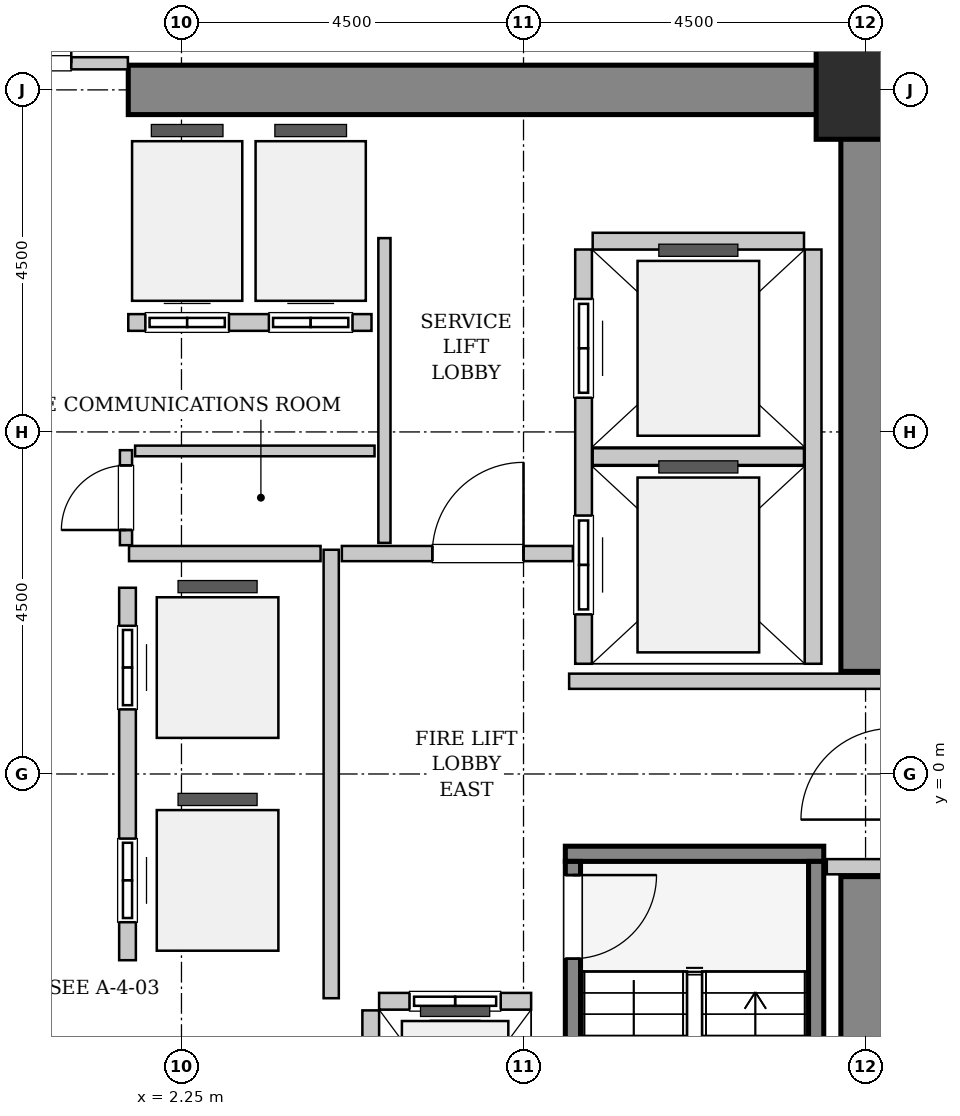
"""IFC4 building model, lengths in metres.
Left out: names, types, materials, properties, quantities, classifications, styles, units other than length and angle.
Written with IfcOpenShell. Run it as: python <this file> out.ifc"""

import sys

from ifc_helpers import new_model, si_unit, direction, frame, frame_2d, origin, origin_2d, place, context, subcontext, project, spatial, rectangle, hollow_rectangle, extrude, source, transform, mapped, element, fill, save


model = new_model("IFC4")
c1 = context("Model", 3, precision=1e-05, world=origin(), true_north=direction((0.0, 1.0)))
c2 = subcontext(c1, "Body", "Model", "MODEL_VIEW")
j1 = project(units=[si_unit("LENGTHUNIT", "METRE"), si_unit("PLANEANGLEUNIT", "RADIAN")], contexts=[c1])
p1 = place(None, origin())
s1 = spatial("IfcSite", under=j1, at=p1, CompositionType="ELEMENT")
p2 = place(p1, origin())
s2 = spatial("IfcBuilding", under=s1, at=p2, CompositionType="ELEMENT")
p3 = place(p2, origin())
s3 = spatial("IfcBuildingStorey", under=s2, at=p3, CompositionType="ELEMENT", Elevation=0.0)
m1 = source(origin(), c2, "Body", "SweptSolid", [
    extrude(rectangle(XDim=10.025, YDim=0.65, at=frame_2d((5.012, 0.0))), origin(), (0.0, 0.0, 1.0), 6.0),
])
p4 = place(p3, frame((1.55, 9.0, 0.0), z_axis=(0.0, 0.0, 1.0), x_axis=(1.0, 0.0, 0.0)))
e1 = element("IfcWall", 1, at=p4, inside=s3, PredefinedType="SHEAR", context=c2, shape_type="MappedRepresentation", body=[
    mapped(m1, transform((0.0, 0.0, 0.0), x_axis=(1.0, 0.0, 0.0), y_axis=(0.0, 1.0, 0.0), z_axis=(0.0, 0.0, 1.0), scale=1.0)),
])
m2 = source(origin(), c2, "Body", "SweptSolid", [
    extrude(rectangle(XDim=7.325, YDim=0.65, at=frame_2d((3.663, 0.0))), origin(), (0.0, 0.0, 1.0), 6.0),
])
for number, where, z_axis, x_axis in (
    (2, (11.25, -8.675, 0.0), (0.0, 0.0, 1.0), (0.0, 1.0, 0.0)),
    (3, (11.25, 1.35, 0.0), (0.0, 0.0, 1.0), (0.0, 1.0, 0.0)),
):
    element("IfcWall", number, at=place(p3, frame(where, z_axis=z_axis, x_axis=x_axis)), inside=s3, PredefinedType="SHEAR", context=c2, shape_type="MappedRepresentation", body=[
        mapped(m2, transform((0.0, 0.0, 0.0), x_axis=(1.0, 0.0, 0.0), y_axis=(0.0, 1.0, 0.0), z_axis=(0.0, 0.0, 1.0), scale=1.0)),
    ])
m3 = source(origin(), c2, "Body", "SweptSolid", [
    extrude(hollow_rectangle(XDim=1.3, YDim=1.3, WallThickness=0.065, InnerFilletRadius=0.065, OuterFilletRadius=0.13, at=origin_2d()), origin(), (0.0, 0.0, 1.0), 6.0),
])
p5 = place(p3, frame((11.25, 9.0, 0.0), z_axis=(0.0, 0.0, 1.0), x_axis=(1.0, 0.0, 0.0)))
e4 = element("IfcColumn", 4, at=p5, inside=s3, PredefinedType="COLUMN", context=c2, shape_type="MappedRepresentation", body=[
    mapped(m3, transform((0.0, 0.0, 0.0), x_axis=(1.0, 0.0, 0.0), y_axis=(0.0, 1.0, 0.0), z_axis=(0.0, 0.0, 1.0), scale=1.0)),
])
m4 = source(origin(), c2, "Body", "SweptSolid", [
    extrude(rectangle(XDim=3.4, YDim=0.2, at=frame_2d((1.7, 0.0))), origin(), (0.0, 0.0, 1.0), 6.0),
])
p6 = place(p3, frame((7.3, -1.05, 0.0), z_axis=(0.0, 0.0, 1.0), x_axis=(1.0, 0.0, 0.0)))
e5 = element("IfcWall", 5, at=p6, inside=s3, PredefinedType="SOLIDWALL", context=c2, shape_type="MappedRepresentation", body=[
    mapped(m4, transform((0.0, 0.0, 0.0), x_axis=(1.0, 0.0, 0.0), y_axis=(0.0, 1.0, 0.0), z_axis=(0.0, 0.0, 1.0), scale=1.0)),
])
m5 = source(origin(), c2, "Body", "SweptSolid", [
    extrude(rectangle(XDim=7.1, YDim=0.2, at=frame_2d((3.55, 0.0))), origin(), (0.0, 0.0, 1.0), 6.0),
])
p7 = place(p3, frame((7.4, -1.15, 0.0), z_axis=(0.0, 0.0, 1.0), x_axis=(0.0, -1.0, 0.0)))
e6 = element("IfcWall", 6, at=p7, inside=s3, PredefinedType="SOLIDWALL", context=c2, shape_type="MappedRepresentation", body=[
    mapped(m5, transform((0.0, 0.0, 0.0), x_axis=(1.0, 0.0, 0.0), y_axis=(0.0, 1.0, 0.0), z_axis=(0.0, 0.0, 1.0), scale=1.0)),
])
p8 = place(p7, frame((0.18, 0.0, 0.0)))
e7 = element("IfcOpeningElement", 7, at=p8, cuts=e6, PredefinedType="OPENING", context=c2, shape_type="SweptSolid", body=[
    extrude(rectangle(XDim=1.1, YDim=2.15, at=frame_2d((0.55, 1.075))), frame((0.0, 0.11, 0.0), z_axis=(0.0, -1.0, 0.0), x_axis=(1.0, 0.0, 0.0)), (0.0, 0.0, 1.0), 0.22),
])
p9 = place(p3, frame((10.6, -1.15, 0.0), z_axis=(0.0, 0.0, 1.0), x_axis=(0.0, -1.0, 0.0)))
e8 = element("IfcWall", 8, at=p9, inside=s3, PredefinedType="SOLIDWALL", context=c2, shape_type="MappedRepresentation", body=[
    mapped(m5, transform((0.0, 0.0, 0.0), x_axis=(1.0, 0.0, 0.0), y_axis=(0.0, 1.0, 0.0), z_axis=(0.0, 0.0, 1.0), scale=1.0)),
])
m6 = source(origin(), c2, "Body", "SweptSolid", [
    extrude(rectangle(XDim=2.0, YDim=0.22, at=frame_2d((1.0, 0.0))), origin(), (0.0, 0.0, 1.0), 5.685),
])
p10 = place(p3, frame((6.85, -2.99, 0.0), z_axis=(0.0, 0.0, 1.0), x_axis=(-1.0, 0.0, 0.0)))
e9 = element("IfcWall", 9, at=p10, inside=s3, PredefinedType="SOLIDWALL", context=c2, shape_type="MappedRepresentation", body=[
    mapped(m6, transform((0.0, 0.0, 0.0), x_axis=(1.0, 0.0, 0.0), y_axis=(0.0, 1.0, 0.0), z_axis=(0.0, 0.0, 1.0), scale=1.0)),
])
p11 = place(p10, frame((0.4, 0.0, 0.0)))
e10 = element("IfcOpeningElement", 10, at=p11, cuts=e9, PredefinedType="OPENING", context=c2, shape_type="SweptSolid", body=[
    extrude(rectangle(XDim=1.2, YDim=2.2, at=frame_2d((0.6, 1.1))), frame((0.0, 0.12, 0.0), z_axis=(0.0, -1.0, 0.0), x_axis=(1.0, 0.0, 0.0)), (0.0, 0.0, 1.0), 0.24),
])
m7 = source(origin(), c2, "Body", "SweptSolid", [
    extrude(rectangle(XDim=2.68, YDim=0.22, at=frame_2d((1.34, 0.0))), origin(), (0.0, 0.0, 1.0), 5.685),
])
p12 = place(p3, frame((4.74, -3.11, 0.0), z_axis=(0.0, 0.0, 1.0), x_axis=(0.0, -1.0, 0.0)))
e11 = element("IfcWall", 11, at=p12, inside=s3, PredefinedType="SOLIDWALL", context=c2, shape_type="MappedRepresentation", body=[
    mapped(m7, transform((0.0, 0.0, 0.0), x_axis=(1.0, 0.0, 0.0), y_axis=(0.0, 1.0, 0.0), z_axis=(0.0, 0.0, 1.0), scale=1.0)),
])
m8 = source(origin(), c2, "Body", "SweptSolid", [
    extrude(rectangle(XDim=5.45, YDim=0.22, at=frame_2d((2.725, 0.0))), origin(), (0.0, 0.0, 1.0), 5.685),
])
p13 = place(p3, frame((7.54, 6.9, 0.0), z_axis=(0.0, 0.0, 1.0), x_axis=(0.0, -1.0, 0.0)))
e12 = element("IfcWall", 12, at=p13, inside=s3, PredefinedType="SOLIDWALL", context=c2, shape_type="MappedRepresentation", body=[
    mapped(m8, transform((0.0, 0.0, 0.0), x_axis=(1.0, 0.0, 0.0), y_axis=(0.0, 1.0, 0.0), z_axis=(0.0, 0.0, 1.0), scale=1.0)),
])
p14 = place(p13, frame((3.5, 0.0, 0.0)))
e13 = element("IfcOpeningElement", 13, at=p14, cuts=e12, PredefinedType="OPENING", context=c2, shape_type="SweptSolid", body=[
    extrude(rectangle(XDim=1.3, YDim=2.3, at=frame_2d((0.65, 1.15))), frame((0.0, 0.12, 0.0), z_axis=(0.0, -1.0, 0.0), x_axis=(1.0, 0.0, 0.0)), (0.0, 0.0, 1.0), 0.24),
])
p15 = place(p13, frame((0.65, 0.0, 0.0)))
e14 = element("IfcOpeningElement", 14, at=p15, cuts=e12, PredefinedType="OPENING", context=c2, shape_type="SweptSolid", body=[
    extrude(rectangle(XDim=1.3, YDim=2.3, at=frame_2d((0.65, 1.15))), frame((0.0, 0.12, 0.0), z_axis=(0.0, -1.0, 0.0), x_axis=(1.0, 0.0, 0.0)), (0.0, 0.0, 1.0), 0.24),
])
p16 = place(p3, frame((10.56, 1.45, 0.0), z_axis=(0.0, 0.0, 1.0), x_axis=(0.0, 1.0, 0.0)))
e15 = element("IfcWall", 15, at=p16, inside=s3, PredefinedType="SOLIDWALL", context=c2, shape_type="MappedRepresentation", body=[
    mapped(m8, transform((0.0, 0.0, 0.0), x_axis=(1.0, 0.0, 0.0), y_axis=(0.0, 1.0, 0.0), z_axis=(0.0, 0.0, 1.0), scale=1.0)),
])
m9 = source(origin(), c2, "Body", "SweptSolid", [
    extrude(rectangle(XDim=2.78, YDim=0.22, at=frame_2d((1.39, 0.0))), origin(), (0.0, 0.0, 1.0), 5.685),
])
for number, where, z_axis, x_axis in (
    (16, (7.66, 4.175, 0.0), (0.0, 0.0, 1.0), (1.0, 0.0, 0.0)),
    (17, (10.44, 7.01, 0.0), (0.0, 0.0, 1.0), (-1.0, 0.0, 0.0)),
):
    element("IfcWall", number, at=place(p3, frame(where, z_axis=z_axis, x_axis=x_axis)), inside=s3, PredefinedType="SOLIDWALL", context=c2, shape_type="MappedRepresentation", body=[
        mapped(m9, transform((0.0, 0.0, 0.0), x_axis=(1.0, 0.0, 0.0), y_axis=(0.0, 1.0, 0.0), z_axis=(0.0, 0.0, 1.0), scale=1.0)),
    ])
m10 = source(origin(), c2, "Body", "SweptSolid", [
    extrude(rectangle(XDim=3.2, YDim=0.22, at=frame_2d((1.6, 0.0))), origin(), (0.0, 0.0, 1.0), 5.685),
])
p17 = place(p3, frame((1.55, 5.94, 0.0), z_axis=(0.0, 0.0, 1.0), x_axis=(1.0, 0.0, 0.0)))
e18 = element("IfcWall", 18, at=p17, inside=s3, PredefinedType="SOLIDWALL", context=c2, shape_type="MappedRepresentation", body=[
    mapped(m10, transform((0.0, 0.0, 0.0), x_axis=(1.0, 0.0, 0.0), y_axis=(0.0, 1.0, 0.0), z_axis=(0.0, 0.0, 1.0), scale=1.0)),
])
p18 = place(p17, frame((0.225, 0.0, 0.0)))
e19 = element("IfcOpeningElement", 19, at=p18, cuts=e18, PredefinedType="OPENING", context=c2, shape_type="SweptSolid", body=[
    extrude(rectangle(XDim=1.1, YDim=2.2, at=frame_2d((0.55, 1.1))), frame((0.0, 0.12, 0.0), z_axis=(0.0, -1.0, 0.0), x_axis=(1.0, 0.0, 0.0)), (0.0, 0.0, 1.0), 0.24),
])
p19 = place(p17, frame((1.85, 0.0, 0.0)))
e20 = element("IfcOpeningElement", 20, at=p19, cuts=e18, PredefinedType="OPENING", context=c2, shape_type="SweptSolid", body=[
    extrude(rectangle(XDim=1.1, YDim=2.2, at=frame_2d((0.55, 1.1))), frame((0.0, 0.12, 0.0), z_axis=(0.0, -1.0, 0.0), x_axis=(1.0, 0.0, 0.0)), (0.0, 0.0, 1.0), 0.24),
])
m11 = source(origin(), c2, "Body", "SweptSolid", [
    extrude(rectangle(XDim=4.9, YDim=0.22, at=frame_2d((2.45, 0.0))), origin(), (0.0, 0.0, 1.0), 5.685),
])
p20 = place(p3, frame((1.54, 2.45, 0.0), z_axis=(0.0, 0.0, 1.0), x_axis=(0.0, -1.0, 0.0)))
e21 = element("IfcWall", 21, at=p20, inside=s3, PredefinedType="SOLIDWALL", context=c2, shape_type="MappedRepresentation", body=[
    mapped(m11, transform((0.0, 0.0, 0.0), x_axis=(1.0, 0.0, 0.0), y_axis=(0.0, 1.0, 0.0), z_axis=(0.0, 0.0, 1.0), scale=1.0)),
])
p21 = place(p20, frame((3.3, 0.0, 0.0)))
e22 = element("IfcOpeningElement", 22, at=p21, cuts=e21, PredefinedType="OPENING", context=c2, shape_type="SweptSolid", body=[
    extrude(rectangle(XDim=1.1, YDim=2.2, at=frame_2d((0.55, 1.1))), frame((0.0, 0.12, 0.0), z_axis=(0.0, -1.0, 0.0), x_axis=(1.0, 0.0, 0.0)), (0.0, 0.0, 1.0), 0.24),
])
p22 = place(p20, frame((0.5, 0.0, 0.0)))
e23 = element("IfcOpeningElement", 23, at=p22, cuts=e21, PredefinedType="OPENING", context=c2, shape_type="SweptSolid", body=[
    extrude(rectangle(XDim=1.1, YDim=2.2, at=frame_2d((0.55, 1.1))), frame((0.0, 0.12, 0.0), z_axis=(0.0, -1.0, 0.0), x_axis=(1.0, 0.0, 0.0)), (0.0, 0.0, 1.0), 0.24),
])
m12 = source(origin(), c2, "Body", "SweptSolid", [
    extrude(rectangle(XDim=5.9, YDim=0.2, at=frame_2d((2.95, 0.0))), origin(), (0.0, 0.0, 1.0), 5.685),
])
p23 = place(p3, frame((4.22, -2.95, 0.0), z_axis=(0.0, 0.0, 1.0), x_axis=(0.0, 1.0, 0.0)))
e24 = element("IfcWall", 24, at=p23, inside=s3, PredefinedType="PARTITIONING", context=c2, shape_type="MappedRepresentation", body=[
    mapped(m12, transform((0.0, 0.0, 0.0), x_axis=(1.0, 0.0, 0.0), y_axis=(0.0, 1.0, 0.0), z_axis=(0.0, 0.0, 1.0), scale=1.0)),
])
m13 = source(origin(), c2, "Body", "SweptSolid", [
    extrude(rectangle(XDim=2.52, YDim=0.2, at=frame_2d((1.26, 0.0))), origin(), (0.0, 0.0, 1.0), 5.685),
])
p24 = place(p3, frame((1.56, 2.9, 0.0), z_axis=(0.0, 0.0, 1.0), x_axis=(1.0, 0.0, 0.0)))
e25 = element("IfcWall", 25, at=p24, inside=s3, PredefinedType="PARTITIONING", context=c2, shape_type="MappedRepresentation", body=[
    mapped(m13, transform((0.0, 0.0, 0.0), x_axis=(1.0, 0.0, 0.0), y_axis=(0.0, 1.0, 0.0), z_axis=(0.0, 0.0, 1.0), scale=1.0)),
])
m14 = source(origin(), c2, "Body", "SweptSolid", [
    extrude(rectangle(XDim=3.04, YDim=0.2, at=frame_2d((1.52, 0.0))), origin(), (0.0, 0.0, 1.0), 5.685),
])
p25 = place(p3, frame((4.36, 2.9, 0.0), z_axis=(0.0, 0.0, 1.0), x_axis=(1.0, 0.0, 0.0)))
e26 = element("IfcWall", 26, at=p25, inside=s3, PredefinedType="PARTITIONING", context=c2, shape_type="MappedRepresentation", body=[
    mapped(m14, transform((0.0, 0.0, 0.0), x_axis=(1.0, 0.0, 0.0), y_axis=(0.0, 1.0, 0.0), z_axis=(0.0, 0.0, 1.0), scale=1.0)),
])
p26 = place(p25, frame((1.19, 0.0, 0.0)))
e27 = element("IfcOpeningElement", 27, at=p26, cuts=e26, PredefinedType="OPENING", context=c2, shape_type="SweptSolid", body=[
    extrude(rectangle(XDim=1.2, YDim=2.15, at=frame_2d((0.6, 1.075))), frame((0.0, 0.11, 0.0), z_axis=(0.0, -1.0, 0.0), x_axis=(1.0, 0.0, 0.0)), (0.0, 0.0, 1.0), 0.22),
])
m15 = source(origin(), c2, "Body", "SweptSolid", [
    extrude(rectangle(XDim=4.11, YDim=0.2, at=frame_2d((2.055, 0.0))), origin(), (0.0, 0.0, 1.0), 5.685),
])
p27 = place(p3, frame((7.35, 1.22, 0.0), z_axis=(0.0, 0.0, 1.0), x_axis=(1.0, 0.0, 0.0)))
e28 = element("IfcWall", 28, at=p27, inside=s3, PredefinedType="PARTITIONING", context=c2, shape_type="MappedRepresentation", body=[
    mapped(m15, transform((0.0, 0.0, 0.0), x_axis=(1.0, 0.0, 0.0), y_axis=(0.0, 1.0, 0.0), z_axis=(0.0, 0.0, 1.0), scale=1.0)),
])
m16 = source(origin(), c2, "Body", "SweptSolid", [
    extrude(rectangle(XDim=0.72, YDim=0.2, at=frame_2d((0.36, 0.0))), origin(), (0.0, 0.0, 1.0), 5.685),
])
p28 = place(p3, frame((10.74, -1.22, 0.0), z_axis=(0.0, 0.0, 1.0), x_axis=(1.0, 0.0, 0.0)))
e29 = element("IfcWall", 29, at=p28, inside=s3, PredefinedType="PARTITIONING", context=c2, shape_type="MappedRepresentation", body=[
    mapped(m16, transform((0.0, 0.0, 0.0), x_axis=(1.0, 0.0, 0.0), y_axis=(0.0, 1.0, 0.0), z_axis=(0.0, 0.0, 1.0), scale=1.0)),
])
m17 = source(origin(), c2, "Body", "SweptSolid", [
    extrude(rectangle(XDim=3.09, YDim=0.16, at=frame_2d((1.545, 0.0))), origin(), (0.0, 0.0, 1.0), 4.575),
])
p29 = place(p3, frame((-1.545, 9.35, 0.0), z_axis=(0.0, 0.0, 1.0), x_axis=(1.0, 0.0, 0.0)))
e30 = element("IfcWall", 30, at=p29, inside=s3, PredefinedType="PARTITIONING", context=c2, shape_type="MappedRepresentation", body=[
    mapped(m17, transform((0.0, 0.0, 0.0), x_axis=(1.0, 0.0, 0.0), y_axis=(0.0, 1.0, 0.0), z_axis=(0.0, 0.0, 1.0), scale=1.0)),
])
p30 = place(p29, frame((0.745, 0.0, 0.0)))
e31 = element("IfcOpeningElement", 31, at=p30, cuts=e30, PredefinedType="OPENING", context=c2, shape_type="SweptSolid", body=[
    extrude(rectangle(XDim=1.6, YDim=2.3, at=frame_2d((0.8, 1.15))), frame((0.0, 0.09, 0.0), z_axis=(0.0, -1.0, 0.0), x_axis=(1.0, 0.0, 0.0)), (0.0, 0.0, 1.0), 0.18),
])
m18 = source(origin(), c2, "Body", "SweptSolid", [
    extrude(rectangle(XDim=4.01, YDim=0.16, at=frame_2d((2.005, 0.0))), origin(), (0.0, 0.0, 1.0), 5.685),
])
p31 = place(p3, frame((4.92, 3.04, 0.0), z_axis=(0.0, 0.0, 1.0), x_axis=(0.0, 1.0, 0.0)))
e32 = element("IfcWall", 32, at=p31, inside=s3, PredefinedType="PARTITIONING", context=c2, shape_type="MappedRepresentation", body=[
    mapped(m18, transform((0.0, 0.0, 0.0), x_axis=(1.0, 0.0, 0.0), y_axis=(0.0, 1.0, 0.0), z_axis=(0.0, 0.0, 1.0), scale=1.0)),
])
m19 = source(origin(), c2, "Body", "SweptSolid", [
    extrude(rectangle(XDim=1.25, YDim=0.16, at=frame_2d((0.625, 0.0))), origin(), (0.0, 0.0, 1.0), 5.685),
])
p32 = place(p3, frame((1.52, 3.01, 0.0), z_axis=(0.0, 0.0, 1.0), x_axis=(0.0, 1.0, 0.0)))
e33 = element("IfcWall", 33, at=p32, inside=s3, PredefinedType="PARTITIONING", context=c2, shape_type="MappedRepresentation", body=[
    mapped(m19, transform((0.0, 0.0, 0.0), x_axis=(1.0, 0.0, 0.0), y_axis=(0.0, 1.0, 0.0), z_axis=(0.0, 0.0, 1.0), scale=1.0)),
])
p33 = place(p32, frame((0.2, 0.0, 0.0)))
e34 = element("IfcOpeningElement", 34, at=p33, cuts=e33, PredefinedType="OPENING", context=c2, shape_type="SweptSolid", body=[
    extrude(rectangle(XDim=0.85, YDim=2.1, at=frame_2d((0.425, 1.05))), frame((0.0, 0.09, 0.0), z_axis=(0.0, -1.0, 0.0), x_axis=(1.0, 0.0, 0.0)), (0.0, 0.0, 1.0), 0.18),
])
m20 = source(origin(), c2, "Body", "SweptSolid", [
    extrude(rectangle(XDim=3.15, YDim=0.14, at=frame_2d((1.575, 0.0))), origin(), (0.0, 0.0, 1.0), 5.685),
])
p34 = place(p3, frame((1.64, 4.25, 0.0), z_axis=(0.0, 0.0, 1.0), x_axis=(1.0, 0.0, 0.0)))
e35 = element("IfcWall", 35, at=p34, inside=s3, PredefinedType="PARTITIONING", context=c2, shape_type="MappedRepresentation", body=[
    mapped(m20, transform((0.0, 0.0, 0.0), x_axis=(1.0, 0.0, 0.0), y_axis=(0.0, 1.0, 0.0), z_axis=(0.0, 0.0, 1.0), scale=1.0)),
])
m21 = source(origin(), c2, "Body", "SweptSolid", [
    extrude(rectangle(XDim=1.1, YDim=2.15, at=frame_2d((0.55, 1.075))), frame((0.0, 0.025, 0.0), z_axis=(0.0, -1.0, 0.0), x_axis=(1.0, 0.0, 0.0)), (0.0, 0.0, 1.0), 0.05),
])
p35 = place(p8, frame((1.1, 0.0, 0.0), z_axis=(0.0, 0.0, 1.0), x_axis=(-1.0, 0.0, 0.0)))
e36 = element("IfcDoor", 36, at=p35, inside=s3, OperationType="SINGLE_SWING_LEFT", PredefinedType="DOOR", context=c2, shape_type="MappedRepresentation", body=[
    mapped(m21, transform((0.0, 0.0, 0.0), x_axis=(1.0, 0.0, 0.0), y_axis=(0.0, 1.0, 0.0), z_axis=(0.0, 0.0, 1.0), scale=1.0)),
])
fill(e7, e36)
m22 = source(origin(), c2, "Body", "SweptSolid", [
    extrude(rectangle(XDim=1.2, YDim=2.2, at=frame_2d((0.6, 1.1))), frame((0.0, 0.025, 0.0), z_axis=(0.0, -1.0, 0.0), x_axis=(1.0, 0.0, 0.0)), (0.0, 0.0, 1.0), 0.05),
])
p36 = place(p11, origin())
e37 = element("IfcDoor", 37, at=p36, inside=s3, OperationType="SLIDING_TO_LEFT", PredefinedType="DOOR", context=c2, shape_type="MappedRepresentation", body=[
    mapped(m22, transform((0.0, 0.0, 0.0), x_axis=(1.0, 0.0, 0.0), y_axis=(0.0, 1.0, 0.0), z_axis=(0.0, 0.0, 1.0), scale=1.0)),
])
fill(e10, e37)
m23 = source(origin(), c2, "Body", "SweptSolid", [
    extrude(rectangle(XDim=1.3, YDim=2.3, at=frame_2d((0.65, 1.15))), frame((0.0, 0.025, 0.0), z_axis=(0.0, -1.0, 0.0), x_axis=(1.0, 0.0, 0.0)), (0.0, 0.0, 1.0), 0.05),
])
p37 = place(p14, origin())
e38 = element("IfcDoor", 38, at=p37, inside=s3, OperationType="SLIDING_TO_RIGHT", PredefinedType="DOOR", context=c2, shape_type="MappedRepresentation", body=[
    mapped(m23, transform((0.0, 0.0, 0.0), x_axis=(1.0, 0.0, 0.0), y_axis=(0.0, 1.0, 0.0), z_axis=(0.0, 0.0, 1.0), scale=1.0)),
])
fill(e13, e38)
p38 = place(p15, origin())
e39 = element("IfcDoor", 39, at=p38, inside=s3, OperationType="SLIDING_TO_RIGHT", PredefinedType="DOOR", context=c2, shape_type="MappedRepresentation", body=[
    mapped(m23, transform((0.0, 0.0, 0.0), x_axis=(1.0, 0.0, 0.0), y_axis=(0.0, 1.0, 0.0), z_axis=(0.0, 0.0, 1.0), scale=1.0)),
])
fill(e14, e39)
m24 = source(origin(), c2, "Body", "SweptSolid", [
    extrude(rectangle(XDim=1.1, YDim=2.2, at=frame_2d((0.55, 1.1))), frame((0.0, 0.025, 0.0), z_axis=(0.0, -1.0, 0.0), x_axis=(1.0, 0.0, 0.0)), (0.0, 0.0, 1.0), 0.05),
])
p39 = place(p18, origin())
e40 = element("IfcDoor", 40, at=p39, inside=s3, OperationType="DOUBLE_DOOR_SLIDING", PredefinedType="DOOR", context=c2, shape_type="MappedRepresentation", body=[
    mapped(m24, transform((0.0, 0.0, 0.0), x_axis=(1.0, 0.0, 0.0), y_axis=(0.0, 1.0, 0.0), z_axis=(0.0, 0.0, 1.0), scale=1.0)),
])
fill(e19, e40)
p40 = place(p19, origin())
e41 = element("IfcDoor", 41, at=p40, inside=s3, OperationType="DOUBLE_DOOR_SLIDING", PredefinedType="DOOR", context=c2, shape_type="MappedRepresentation", body=[
    mapped(m24, transform((0.0, 0.0, 0.0), x_axis=(1.0, 0.0, 0.0), y_axis=(0.0, 1.0, 0.0), z_axis=(0.0, 0.0, 1.0), scale=1.0)),
])
fill(e20, e41)
p41 = place(p21, origin())
e42 = element("IfcDoor", 42, at=p41, inside=s3, OperationType="DOUBLE_DOOR_SLIDING", PredefinedType="DOOR", context=c2, shape_type="MappedRepresentation", body=[
    mapped(m24, transform((0.0, 0.0, 0.0), x_axis=(1.0, 0.0, 0.0), y_axis=(0.0, 1.0, 0.0), z_axis=(0.0, 0.0, 1.0), scale=1.0)),
])
fill(e22, e42)
p42 = place(p22, origin())
e43 = element("IfcDoor", 43, at=p42, inside=s3, OperationType="DOUBLE_DOOR_SLIDING", PredefinedType="DOOR", context=c2, shape_type="MappedRepresentation", body=[
    mapped(m24, transform((0.0, 0.0, 0.0), x_axis=(1.0, 0.0, 0.0), y_axis=(0.0, 1.0, 0.0), z_axis=(0.0, 0.0, 1.0), scale=1.0)),
])
fill(e23, e43)
m25 = source(origin(), c2, "Body", "SweptSolid", [
    extrude(rectangle(XDim=1.2, YDim=2.15, at=frame_2d((0.6, 1.075))), frame((0.0, 0.025, 0.0), z_axis=(0.0, -1.0, 0.0), x_axis=(1.0, 0.0, 0.0)), (0.0, 0.0, 1.0), 0.05),
])
p43 = place(p26, origin())
e44 = element("IfcDoor", 44, at=p43, inside=s3, OperationType="SINGLE_SWING_RIGHT", PredefinedType="DOOR", context=c2, shape_type="MappedRepresentation", body=[
    mapped(m25, transform((0.0, 0.0, 0.0), x_axis=(1.0, 0.0, 0.0), y_axis=(0.0, 1.0, 0.0), z_axis=(0.0, 0.0, 1.0), scale=1.0)),
])
fill(e27, e44)
m26 = source(origin(), c2, "Body", "SweptSolid", [
    extrude(rectangle(XDim=1.6, YDim=2.3, at=frame_2d((0.8, 1.15))), frame((0.0, 0.025, 0.0), z_axis=(0.0, -1.0, 0.0), x_axis=(1.0, 0.0, 0.0)), (0.0, 0.0, 1.0), 0.05),
])
p44 = place(p30, origin())
e45 = element("IfcDoor", 45, at=p44, inside=s3, OperationType="DOUBLE_DOOR_SINGLE_SWING", PredefinedType="DOOR", context=c2, shape_type="MappedRepresentation", body=[
    mapped(m26, transform((0.0, 0.0, 0.0), x_axis=(1.0, 0.0, 0.0), y_axis=(0.0, 1.0, 0.0), z_axis=(0.0, 0.0, 1.0), scale=1.0)),
])
fill(e31, e45)
m27 = source(origin(), c2, "Body", "SweptSolid", [
    extrude(rectangle(XDim=0.85, YDim=2.1, at=frame_2d((0.425, 1.05))), frame((0.0, 0.025, 0.0), z_axis=(0.0, -1.0, 0.0), x_axis=(1.0, 0.0, 0.0)), (0.0, 0.0, 1.0), 0.05),
])
p45 = place(p33, origin())
e46 = element("IfcDoor", 46, at=p45, inside=s3, OperationType="SINGLE_SWING_LEFT", PredefinedType="DOOR", context=c2, shape_type="MappedRepresentation", body=[
    mapped(m27, transform((0.0, 0.0, 0.0), x_axis=(1.0, 0.0, 0.0), y_axis=(0.0, 1.0, 0.0), z_axis=(0.0, 0.0, 1.0), scale=1.0)),
])
fill(e34, e46)
save(model, sys.argv[1])
